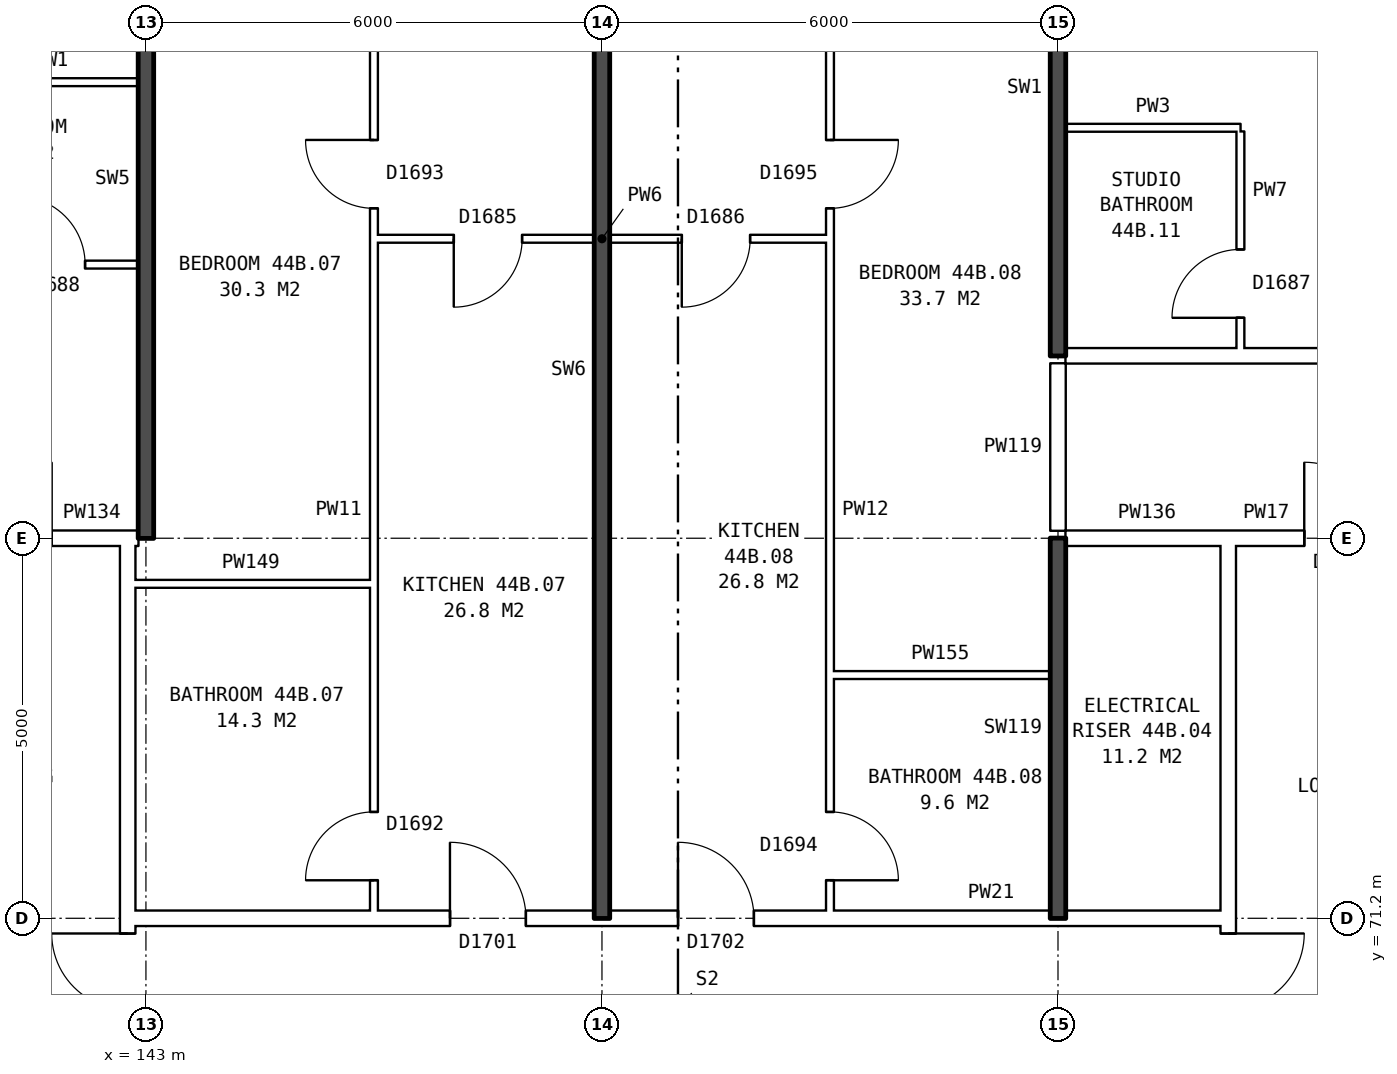
"""IFC4 building model, lengths in metres.
Left out: names, types, materials, properties, quantities, classifications, styles, units other than length and angle.
Written with IfcOpenShell. Run it as: python <this file> out.ifc"""

import sys

from ifc_helpers import new_model, si_unit, direction, frame, frame_2d, origin, place, context, subcontext, project, spatial, rectangle, extrude, element, fill, save


model = new_model("IFC4")
c1 = context("Model", 3, precision=1e-05, world=origin(), true_north=direction((0.0, 1.0)))
c2 = subcontext(c1, "Body", "Model", "MODEL_VIEW")
j1 = project(units=[si_unit("LENGTHUNIT", "METRE"), si_unit("PLANEANGLEUNIT", "RADIAN")], contexts=[c1])
p1 = place(None, origin())
s1 = spatial("IfcSite", under=j1, at=p1, CompositionType="ELEMENT")
p2 = place(p1, origin())
s2 = spatial("IfcBuilding", under=s1, at=p2, CompositionType="ELEMENT")
p3 = place(p2, frame((0.0, 0.0, 157.8)))
s3 = spatial("IfcBuildingStorey", under=s2, at=p3, CompositionType="ELEMENT", Elevation=157.8)
p4 = place(p3, frame((142.76, 63.9, 0.0), z_axis=(0.0, 0.0, 1.0), x_axis=(0.0, 1.0, 0.0)))
e1 = element("IfcWall", 1, at=p4, inside=s3, PredefinedType="PARTITIONING", context=c2, shape_type="SweptSolid", body=[
    extrude(rectangle(XDim=12.2, YDim=0.2, at=frame_2d((6.1, 0.0))), origin(), (0.0, 0.0, 1.0), 2.85),
])
p5 = place(p4, frame((5.1, 0.0, 0.0)))
e2 = element("IfcOpeningElement", 2, at=p5, cuts=e1, PredefinedType="OPENING", context=c2, shape_type="SweptSolid", body=[
    extrude(rectangle(XDim=2.0, YDim=2.1, at=frame_2d((1.0, 1.05))), frame((0.0, 0.11, 0.0), z_axis=(0.0, -1.0, 0.0), x_axis=(1.0, 0.0, 0.0)), (0.0, 0.0, 1.0), 0.22),
])
p6 = place(p3, frame((157.24, 63.9, 0.0), z_axis=(0.0, 0.0, 1.0), x_axis=(0.0, 1.0, 0.0)))
e3 = element("IfcWall", 3, at=p6, inside=s3, PredefinedType="PARTITIONING", context=c2, shape_type="SweptSolid", body=[
    extrude(rectangle(XDim=12.2, YDim=0.2, at=frame_2d((6.1, 0.0))), origin(), (0.0, 0.0, 1.0), 2.85),
])
p7 = place(p6, frame((5.1, 0.0, 0.0)))
e4 = element("IfcOpeningElement", 4, at=p7, cuts=e3, PredefinedType="OPENING", context=c2, shape_type="SweptSolid", body=[
    extrude(rectangle(XDim=2.0, YDim=2.1, at=frame_2d((1.0, 1.05))), frame((0.0, 0.11, 0.0), z_axis=(0.0, -1.0, 0.0), x_axis=(1.0, 0.0, 0.0)), (0.0, 0.0, 1.0), 0.22),
])
p8 = place(p3, frame((142.76, 71.2, 0.0), z_axis=(0.0, 0.0, 1.0), x_axis=(1.0, 0.0, 0.0)))
e5 = element("IfcWall", 5, at=p8, inside=s3, PredefinedType="PARTITIONING", context=c2, shape_type="SweptSolid", body=[
    extrude(rectangle(XDim=14.48, YDim=0.2, at=frame_2d((7.24, 0.0))), origin(), (0.0, 0.0, 1.0), 2.85),
])
p9 = place(p8, frame((4.24, 0.0, 0.0)))
e6 = element("IfcOpeningElement", 6, at=p9, cuts=e5, PredefinedType="OPENING", context=c2, shape_type="SweptSolid", body=[
    extrude(rectangle(XDim=1.0, YDim=2.1, at=frame_2d((0.5, 1.05))), frame((0.0, 0.11, 0.0), z_axis=(0.0, -1.0, 0.0), x_axis=(1.0, 0.0, 0.0)), (0.0, 0.0, 1.0), 0.22),
])
p10 = place(p8, frame((7.24, 0.0, 0.0)))
e7 = element("IfcOpeningElement", 7, at=p10, cuts=e5, PredefinedType="OPENING", context=c2, shape_type="SweptSolid", body=[
    extrude(rectangle(XDim=1.0, YDim=2.1, at=frame_2d((0.5, 1.05))), frame((0.0, 0.11, 0.0), z_axis=(0.0, -1.0, 0.0), x_axis=(1.0, 0.0, 0.0)), (0.0, 0.0, 1.0), 0.22),
])
p11 = place(p3, frame((152.0, 74.4, 0.0), z_axis=(0.0, 0.0, 1.0), x_axis=(1.0, 0.0, 0.0)))
e8 = element("IfcWall", 8, at=p11, inside=s3, PredefinedType="PARTITIONING", context=c2, shape_type="SweptSolid", body=[
    extrude(rectangle(XDim=2.9, YDim=0.1, at=frame_2d((1.45, 0.0))), origin(), (0.0, 0.0, 1.0), 2.85),
])
p12 = place(p3, frame((142.76, 75.6, 0.0), z_axis=(0.0, 0.0, 1.0), x_axis=(1.0, 0.0, 0.0)))
e9 = element("IfcWall", 9, at=p12, inside=s3, PredefinedType="PARTITIONING", context=c2, shape_type="SweptSolid", body=[
    extrude(rectangle(XDim=3.24, YDim=0.1, at=frame_2d((1.62, 0.0))), origin(), (0.0, 0.0, 1.0), 2.85),
])
p13 = place(p3, frame((139.76, 76.2, 0.0), z_axis=(0.0, 0.0, 1.0), x_axis=(1.0, 0.0, 0.0)))
e10 = element("IfcWall", 10, at=p13, inside=s3, PredefinedType="PARTITIONING", context=c2, shape_type="SweptSolid", body=[
    extrude(rectangle(XDim=3.0, YDim=0.2, at=frame_2d((1.5, 0.0))), origin(), (0.0, 0.0, 1.0), 2.85),
])
p14 = place(p13, frame((1.0, 0.0, 0.0)))
e11 = element("IfcOpeningElement", 11, at=p14, cuts=e10, PredefinedType="OPENING", context=c2, shape_type="SweptSolid", body=[
    extrude(rectangle(XDim=1.0, YDim=2.1, at=frame_2d((0.5, 1.05))), frame((0.0, 0.11, 0.0), z_axis=(0.0, -1.0, 0.0), x_axis=(1.0, 0.0, 0.0)), (0.0, 0.0, 1.0), 0.22),
])
p15 = place(p3, frame((142.76, 76.2, 0.0), z_axis=(0.0, 0.0, 1.0), x_axis=(1.0, 0.0, 0.0)))
e12 = element("IfcWall", 12, at=p15, inside=s3, PredefinedType="PARTITIONING", context=c2, shape_type="SweptSolid", body=[
    extrude(rectangle(XDim=0.14, YDim=0.2, at=frame_2d((0.07, 0.0))), origin(), (0.0, 0.0, 1.0), 2.85),
])
p16 = place(p3, frame((155.1, 76.2, 0.0), z_axis=(0.0, 0.0, 1.0), x_axis=(1.0, 0.0, 0.0)))
e13 = element("IfcWall", 13, at=p16, inside=s3, PredefinedType="PARTITIONING", context=c2, shape_type="SweptSolid", body=[
    extrude(rectangle(XDim=2.14, YDim=0.2, at=frame_2d((1.07, 0.0))), origin(), (0.0, 0.0, 1.0), 2.85),
])
p17 = place(p3, frame((157.24, 76.2, 0.0), z_axis=(0.0, 0.0, 1.0), x_axis=(1.0, 0.0, 0.0)))
e14 = element("IfcWall", 14, at=p17, inside=s3, PredefinedType="PARTITIONING", context=c2, shape_type="SweptSolid", body=[
    extrude(rectangle(XDim=3.0, YDim=0.2, at=frame_2d((1.5, 0.0))), origin(), (0.0, 0.0, 1.0), 2.85),
])
p18 = place(p17, frame((1.0, 0.0, 0.0)))
e15 = element("IfcOpeningElement", 15, at=p18, cuts=e14, PredefinedType="OPENING", context=c2, shape_type="SweptSolid", body=[
    extrude(rectangle(XDim=1.0, YDim=2.1, at=frame_2d((0.5, 1.05))), frame((0.0, 0.11, 0.0), z_axis=(0.0, -1.0, 0.0), x_axis=(1.0, 0.0, 0.0)), (0.0, 0.0, 1.0), 0.22),
])
p19 = place(p3, frame((155.1, 78.6, 0.0), z_axis=(0.0, 0.0, 1.0), x_axis=(1.0, 0.0, 0.0)))
e16 = element("IfcWall", 16, at=p19, inside=s3, PredefinedType="PARTITIONING", context=c2, shape_type="SweptSolid", body=[
    extrude(rectangle(XDim=16.04, YDim=0.2, at=frame_2d((8.02, 0.0))), origin(), (0.0, 0.0, 1.0), 2.85),
])
p20 = place(p19, frame((3.6, 0.0, 0.0)))
e17 = element("IfcOpeningElement", 17, at=p20, cuts=e16, PredefinedType="OPENING", context=c2, shape_type="SweptSolid", body=[
    extrude(rectangle(XDim=1.0, YDim=2.1, at=frame_2d((0.5, 1.05))), frame((0.0, 0.11, 0.0), z_axis=(0.0, -1.0, 0.0), x_axis=(1.0, 0.0, 0.0)), (0.0, 0.0, 1.0), 0.22),
])
p21 = place(p19, frame((8.4, 0.0, 0.0)))
e18 = element("IfcOpeningElement", 18, at=p21, cuts=e16, PredefinedType="OPENING", context=c2, shape_type="SweptSolid", body=[
    extrude(rectangle(XDim=1.0, YDim=2.1, at=frame_2d((0.5, 1.05))), frame((0.0, 0.11, 0.0), z_axis=(0.0, -1.0, 0.0), x_axis=(1.0, 0.0, 0.0)), (0.0, 0.0, 1.0), 0.22),
])
p22 = place(p3, frame((137.1, 79.8, 0.0), z_axis=(0.0, 0.0, 1.0), x_axis=(1.0, 0.0, 0.0)))
e19 = element("IfcWall", 19, at=p22, inside=s3, PredefinedType="PARTITIONING", context=c2, shape_type="SweptSolid", body=[
    extrude(rectangle(XDim=5.8, YDim=0.1, at=frame_2d((2.9, 0.0))), origin(), (0.0, 0.0, 1.0), 2.85),
])
p23 = place(p22, frame((1.3, 0.0, 0.0)))
e20 = element("IfcOpeningElement", 20, at=p23, cuts=e19, PredefinedType="OPENING", context=c2, shape_type="SweptSolid", body=[
    extrude(rectangle(XDim=0.9, YDim=2.1, at=frame_2d((0.45, 1.05))), frame((0.0, 0.06, 0.0), z_axis=(0.0, -1.0, 0.0), x_axis=(1.0, 0.0, 0.0)), (0.0, 0.0, 1.0), 0.12),
])
p24 = place(p22, frame((4.2, 0.0, 0.0)))
e21 = element("IfcOpeningElement", 21, at=p24, cuts=e19, PredefinedType="OPENING", context=c2, shape_type="SweptSolid", body=[
    extrude(rectangle(XDim=0.9, YDim=2.1, at=frame_2d((0.45, 1.05))), frame((0.0, 0.06, 0.0), z_axis=(0.0, -1.0, 0.0), x_axis=(1.0, 0.0, 0.0)), (0.0, 0.0, 1.0), 0.12),
])
p25 = place(p3, frame((146.0, 80.14, 0.0), z_axis=(0.0, 0.0, 1.0), x_axis=(1.0, 0.0, 0.0)))
e22 = element("IfcWall", 22, at=p25, inside=s3, PredefinedType="PARTITIONING", context=c2, shape_type="SweptSolid", body=[
    extrude(rectangle(XDim=6.0, YDim=0.1, at=frame_2d((3.0, 0.0))), origin(), (0.0, 0.0, 1.0), 2.85),
])
p26 = place(p25, frame((1.05, 0.0, 0.0)))
e23 = element("IfcOpeningElement", 23, at=p26, cuts=e22, PredefinedType="OPENING", context=c2, shape_type="SweptSolid", body=[
    extrude(rectangle(XDim=0.9, YDim=2.1, at=frame_2d((0.45, 1.05))), frame((0.0, 0.06, 0.0), z_axis=(0.0, -1.0, 0.0), x_axis=(1.0, 0.0, 0.0)), (0.0, 0.0, 1.0), 0.12),
])
p27 = place(p25, frame((4.05, 0.0, 0.0)))
e24 = element("IfcOpeningElement", 24, at=p27, cuts=e22, PredefinedType="OPENING", context=c2, shape_type="SweptSolid", body=[
    extrude(rectangle(XDim=0.9, YDim=2.1, at=frame_2d((0.45, 1.05))), frame((0.0, 0.06, 0.0), z_axis=(0.0, -1.0, 0.0), x_axis=(1.0, 0.0, 0.0)), (0.0, 0.0, 1.0), 0.12),
])
for number, where, z_axis, x_axis in (
    (25, (155.1, 81.6, 0.0), (0.0, 0.0, 1.0), (1.0, 0.0, 0.0)),
    (26, (140.6, 82.2, 0.0), (0.0, 0.0, 1.0), (1.0, 0.0, 0.0)),
):
    element("IfcWall", number, at=place(p3, frame(where, z_axis=z_axis, x_axis=x_axis)), inside=s3, PredefinedType="PARTITIONING", context=c2, shape_type="SweptSolid", body=[
        extrude(rectangle(XDim=2.3, YDim=0.1, at=frame_2d((1.15, 0.0))), origin(), (0.0, 0.0, 1.0), 2.85),
    ])
p28 = place(p3, frame((143.0, 76.2, 0.0), z_axis=(0.0, 0.0, 1.0), x_axis=(0.0, 1.0, 0.0)))
e27 = element("IfcWall", 27, at=p28, inside=s3, PredefinedType="SOLIDWALL", context=c2, shape_type="SweptSolid", body=[
    extrude(rectangle(XDim=9.44, YDim=0.2, at=frame_2d((4.72, 0.0))), origin(), (0.0, 0.0, 1.0), 2.85),
])
p29 = place(p3, frame((146.0, 71.3, 0.0), z_axis=(0.0, 0.0, 1.0), x_axis=(0.0, 1.0, 0.0)))
e28 = element("IfcWall", 28, at=p29, inside=s3, PredefinedType="PARTITIONING", context=c2, shape_type="SweptSolid", body=[
    extrude(rectangle(XDim=14.34, YDim=0.1, at=frame_2d((7.17, 0.0))), origin(), (0.0, 0.0, 1.0), 2.85),
])
p30 = place(p29, frame((9.24, 0.0, 0.0)))
e29 = element("IfcOpeningElement", 29, at=p30, cuts=e28, PredefinedType="OPENING", context=c2, shape_type="SweptSolid", body=[
    extrude(rectangle(XDim=0.9, YDim=2.1, at=frame_2d((0.45, 1.05))), frame((0.0, 0.06, 0.0), z_axis=(0.0, -1.0, 0.0), x_axis=(1.0, 0.0, 0.0)), (0.0, 0.0, 1.0), 0.12),
])
p31 = place(p29, frame((0.4, 0.0, 0.0)))
e30 = element("IfcOpeningElement", 30, at=p31, cuts=e28, PredefinedType="OPENING", context=c2, shape_type="SweptSolid", body=[
    extrude(rectangle(XDim=0.9, YDim=2.1, at=frame_2d((0.45, 1.05))), frame((0.0, 0.06, 0.0), z_axis=(0.0, -1.0, 0.0), x_axis=(1.0, 0.0, 0.0)), (0.0, 0.0, 1.0), 0.12),
])
p32 = place(p3, frame((149.0, 71.2, 0.0), z_axis=(0.0, 0.0, 1.0), x_axis=(0.0, 1.0, 0.0)))
e31 = element("IfcWall", 31, at=p32, inside=s3, PredefinedType="SOLIDWALL", context=c2, shape_type="SweptSolid", body=[
    extrude(rectangle(XDim=14.44, YDim=0.2, at=frame_2d((7.22, 0.0))), origin(), (0.0, 0.0, 1.0), 2.85),
])
p33 = place(p3, frame((152.0, 71.3, 0.0), z_axis=(0.0, 0.0, 1.0), x_axis=(0.0, 1.0, 0.0)))
e32 = element("IfcWall", 32, at=p33, inside=s3, PredefinedType="PARTITIONING", context=c2, shape_type="SweptSolid", body=[
    extrude(rectangle(XDim=14.34, YDim=0.1, at=frame_2d((7.17, 0.0))), origin(), (0.0, 0.0, 1.0), 2.85),
])
p34 = place(p33, frame((9.24, 0.0, 0.0)))
e33 = element("IfcOpeningElement", 33, at=p34, cuts=e32, PredefinedType="OPENING", context=c2, shape_type="SweptSolid", body=[
    extrude(rectangle(XDim=0.9, YDim=2.1, at=frame_2d((0.45, 1.05))), frame((0.0, 0.06, 0.0), z_axis=(0.0, -1.0, 0.0), x_axis=(1.0, 0.0, 0.0)), (0.0, 0.0, 1.0), 0.12),
])
p35 = place(p33, frame((0.4, 0.0, 0.0)))
e34 = element("IfcOpeningElement", 34, at=p35, cuts=e32, PredefinedType="OPENING", context=c2, shape_type="SweptSolid", body=[
    extrude(rectangle(XDim=0.9, YDim=2.1, at=frame_2d((0.45, 1.05))), frame((0.0, 0.06, 0.0), z_axis=(0.0, -1.0, 0.0), x_axis=(1.0, 0.0, 0.0)), (0.0, 0.0, 1.0), 0.12),
])
p36 = place(p3, frame((155.0, 71.2, 0.0), z_axis=(0.0, 0.0, 1.0), x_axis=(0.0, 1.0, 0.0)))
e35 = element("IfcWall", 35, at=p36, inside=s3, PredefinedType="SOLIDWALL", context=c2, shape_type="SweptSolid", body=[
    extrude(rectangle(XDim=5.0, YDim=0.2, at=frame_2d((2.5, 0.0))), origin(), (0.0, 0.0, 1.0), 2.85),
])
p37 = place(p3, frame((155.0, 76.3, 0.0), z_axis=(0.0, 0.0, 1.0), x_axis=(0.0, 1.0, 0.0)))
e36 = element("IfcWall", 36, at=p37, inside=s3, PredefinedType="PARTITIONING", context=c2, shape_type="SweptSolid", body=[
    extrude(rectangle(XDim=2.2, YDim=0.2, at=frame_2d((1.1, 0.0))), origin(), (0.0, 0.0, 1.0), 2.85),
])
p38 = place(p3, frame((155.0, 78.6, 0.0), z_axis=(0.0, 0.0, 1.0), x_axis=(0.0, 1.0, 0.0)))
e37 = element("IfcWall", 37, at=p38, inside=s3, PredefinedType="SOLIDWALL", context=c2, shape_type="SweptSolid", body=[
    extrude(rectangle(XDim=7.04, YDim=0.2, at=frame_2d((3.52, 0.0))), origin(), (0.0, 0.0, 1.0), 2.85),
])
p39 = place(p3, frame((157.4, 78.7, 0.0), z_axis=(0.0, 0.0, 1.0), x_axis=(0.0, 1.0, 0.0)))
e38 = element("IfcWall", 38, at=p39, inside=s3, PredefinedType="PARTITIONING", context=c2, shape_type="SweptSolid", body=[
    extrude(rectangle(XDim=2.85, YDim=0.1, at=frame_2d((1.425, 0.0))), origin(), (0.0, 0.0, 1.0), 2.85),
])
p40 = place(p39, frame((0.4, 0.0, 0.0)))
e39 = element("IfcOpeningElement", 39, at=p40, cuts=e38, PredefinedType="OPENING", context=c2, shape_type="SweptSolid", body=[
    extrude(rectangle(XDim=0.9, YDim=2.1, at=frame_2d((0.45, 1.05))), frame((0.0, 0.06, 0.0), z_axis=(0.0, -1.0, 0.0), x_axis=(1.0, 0.0, 0.0)), (0.0, 0.0, 1.0), 0.12),
])
p41 = place(p5, origin())
e40 = element("IfcDoor", 40, at=p41, inside=s3, OperationType="DOUBLE_DOOR_SINGLE_SWING", PredefinedType="DOOR", context=c2, shape_type="SweptSolid", body=[
    extrude(rectangle(XDim=2.0, YDim=2.1, at=frame_2d((1.0, 1.05))), frame((0.0, 0.025, 0.0), z_axis=(0.0, -1.0, 0.0), x_axis=(1.0, 0.0, 0.0)), (0.0, 0.0, 1.0), 0.05),
])
fill(e2, e40)
p42 = place(p7, frame((2.0, 0.0, 0.0), z_axis=(0.0, 0.0, 1.0), x_axis=(-1.0, 0.0, 0.0)))
e41 = element("IfcDoor", 41, at=p42, inside=s3, OperationType="DOUBLE_DOOR_SINGLE_SWING", PredefinedType="DOOR", context=c2, shape_type="SweptSolid", body=[
    extrude(rectangle(XDim=2.0, YDim=2.1, at=frame_2d((1.0, 1.05))), frame((0.0, 0.025, 0.0), z_axis=(0.0, -1.0, 0.0), x_axis=(1.0, 0.0, 0.0)), (0.0, 0.0, 1.0), 0.05),
])
fill(e4, e41)
p43 = place(p18, origin())
e42 = element("IfcDoor", 42, at=p43, inside=s3, OperationType="SINGLE_SWING_LEFT", PredefinedType="DOOR", context=c2, shape_type="SweptSolid", body=[
    extrude(rectangle(XDim=1.0, YDim=2.1, at=frame_2d((0.5, 1.05))), frame((0.0, 0.025, 0.0), z_axis=(0.0, -1.0, 0.0), x_axis=(1.0, 0.0, 0.0)), (0.0, 0.0, 1.0), 0.05),
])
fill(e15, e42)
p44 = place(p24, origin())
e43 = element("IfcDoor", 43, at=p44, inside=s3, OperationType="SINGLE_SWING_LEFT", PredefinedType="DOOR", context=c2, shape_type="SweptSolid", body=[
    extrude(rectangle(XDim=0.9, YDim=2.1, at=frame_2d((0.45, 1.05))), frame((0.0, 0.025, 0.0), z_axis=(0.0, -1.0, 0.0), x_axis=(1.0, 0.0, 0.0)), (0.0, 0.0, 1.0), 0.05),
])
fill(e21, e43)
p45 = place(p30, origin())
e44 = element("IfcDoor", 44, at=p45, inside=s3, OperationType="SINGLE_SWING_RIGHT", PredefinedType="DOOR", context=c2, shape_type="SweptSolid", body=[
    extrude(rectangle(XDim=0.9, YDim=2.1, at=frame_2d((0.45, 1.05))), frame((0.0, 0.025, 0.0), z_axis=(0.0, -1.0, 0.0), x_axis=(1.0, 0.0, 0.0)), (0.0, 0.0, 1.0), 0.05),
])
fill(e29, e44)
p46 = place(p9, origin())
e45 = element("IfcDoor", 45, at=p46, inside=s3, OperationType="SINGLE_SWING_LEFT", PredefinedType="DOOR", context=c2, shape_type="SweptSolid", body=[
    extrude(rectangle(XDim=1.0, YDim=2.1, at=frame_2d((0.5, 1.05))), frame((0.0, 0.025, 0.0), z_axis=(0.0, -1.0, 0.0), x_axis=(1.0, 0.0, 0.0)), (0.0, 0.0, 1.0), 0.05),
])
fill(e6, e45)
p47 = place(p26, frame((0.9, 0.0, 0.0), z_axis=(0.0, 0.0, 1.0), x_axis=(-1.0, 0.0, 0.0)))
e46 = element("IfcDoor", 46, at=p47, inside=s3, OperationType="SINGLE_SWING_RIGHT", PredefinedType="DOOR", context=c2, shape_type="SweptSolid", body=[
    extrude(rectangle(XDim=0.9, YDim=2.1, at=frame_2d((0.45, 1.05))), frame((0.0, 0.025, 0.0), z_axis=(0.0, -1.0, 0.0), x_axis=(1.0, 0.0, 0.0)), (0.0, 0.0, 1.0), 0.05),
])
fill(e23, e46)
p48 = place(p31, origin())
e47 = element("IfcDoor", 47, at=p48, inside=s3, OperationType="SINGLE_SWING_LEFT", PredefinedType="DOOR", context=c2, shape_type="SweptSolid", body=[
    extrude(rectangle(XDim=0.9, YDim=2.1, at=frame_2d((0.45, 1.05))), frame((0.0, 0.025, 0.0), z_axis=(0.0, -1.0, 0.0), x_axis=(1.0, 0.0, 0.0)), (0.0, 0.0, 1.0), 0.05),
])
fill(e30, e47)
p49 = place(p34, frame((0.9, 0.0, 0.0), z_axis=(0.0, 0.0, 1.0), x_axis=(-1.0, 0.0, 0.0)))
e48 = element("IfcDoor", 48, at=p49, inside=s3, OperationType="SINGLE_SWING_LEFT", PredefinedType="DOOR", context=c2, shape_type="SweptSolid", body=[
    extrude(rectangle(XDim=0.9, YDim=2.1, at=frame_2d((0.45, 1.05))), frame((0.0, 0.025, 0.0), z_axis=(0.0, -1.0, 0.0), x_axis=(1.0, 0.0, 0.0)), (0.0, 0.0, 1.0), 0.05),
])
fill(e33, e48)
p50 = place(p10, origin())
e49 = element("IfcDoor", 49, at=p50, inside=s3, OperationType="SINGLE_SWING_LEFT", PredefinedType="DOOR", context=c2, shape_type="SweptSolid", body=[
    extrude(rectangle(XDim=1.0, YDim=2.1, at=frame_2d((0.5, 1.05))), frame((0.0, 0.025, 0.0), z_axis=(0.0, -1.0, 0.0), x_axis=(1.0, 0.0, 0.0)), (0.0, 0.0, 1.0), 0.05),
])
fill(e7, e49)
p51 = place(p27, frame((0.9, 0.0, 0.0), z_axis=(0.0, 0.0, 1.0), x_axis=(-1.0, 0.0, 0.0)))
e50 = element("IfcDoor", 50, at=p51, inside=s3, OperationType="SINGLE_SWING_RIGHT", PredefinedType="DOOR", context=c2, shape_type="SweptSolid", body=[
    extrude(rectangle(XDim=0.9, YDim=2.1, at=frame_2d((0.45, 1.05))), frame((0.0, 0.025, 0.0), z_axis=(0.0, -1.0, 0.0), x_axis=(1.0, 0.0, 0.0)), (0.0, 0.0, 1.0), 0.05),
])
fill(e24, e50)
p52 = place(p35, frame((0.9, 0.0, 0.0), z_axis=(0.0, 0.0, 1.0), x_axis=(-1.0, 0.0, 0.0)))
e51 = element("IfcDoor", 51, at=p52, inside=s3, OperationType="SINGLE_SWING_RIGHT", PredefinedType="DOOR", context=c2, shape_type="SweptSolid", body=[
    extrude(rectangle(XDim=0.9, YDim=2.1, at=frame_2d((0.45, 1.05))), frame((0.0, 0.025, 0.0), z_axis=(0.0, -1.0, 0.0), x_axis=(1.0, 0.0, 0.0)), (0.0, 0.0, 1.0), 0.05),
])
fill(e34, e51)
p53 = place(p40, origin())
e52 = element("IfcDoor", 52, at=p53, inside=s3, OperationType="SINGLE_SWING_LEFT", PredefinedType="DOOR", context=c2, shape_type="SweptSolid", body=[
    extrude(rectangle(XDim=0.9, YDim=2.1, at=frame_2d((0.45, 1.05))), frame((0.0, 0.025, 0.0), z_axis=(0.0, -1.0, 0.0), x_axis=(1.0, 0.0, 0.0)), (0.0, 0.0, 1.0), 0.05),
])
fill(e39, e52)
save(model, sys.argv[1])
